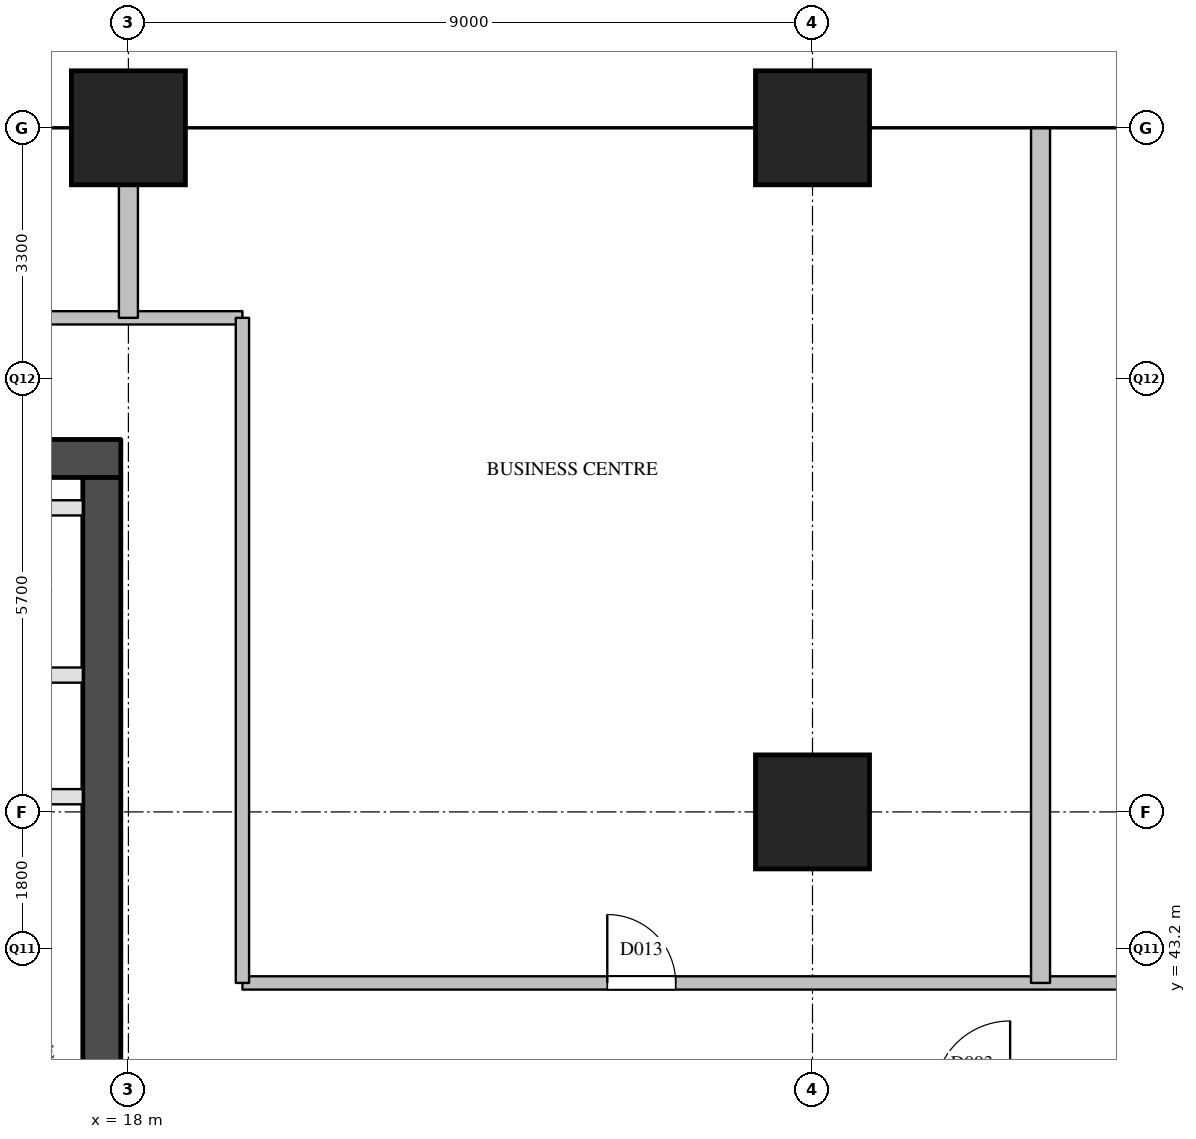
"""IFC4 building model, lengths in metres.
Left out: names, types, materials, properties, quantities, classifications, styles, units other than length and angle.
Written with IfcOpenShell. Run it as: python <this file> out.ifc"""

import sys

from ifc_helpers import new_model, si_unit, direction, frame, frame_2d, origin, origin_2d, place, context, subcontext, project, spatial, rectangle, extrude, element, fill, save


model = new_model("IFC4")
c1 = context("Model", 3, precision=1e-05, world=origin(), true_north=direction((0.0, 1.0)))
c2 = subcontext(c1, "Body", "Model", "MODEL_VIEW")
j1 = project(units=[si_unit("LENGTHUNIT", "METRE"), si_unit("PLANEANGLEUNIT", "RADIAN")], contexts=[c1])
p1 = place(None, origin())
s1 = spatial("IfcSite", under=j1, at=p1, CompositionType="ELEMENT")
p2 = place(p1, origin())
s2 = spatial("IfcBuilding", under=s1, at=p2, CompositionType="ELEMENT")
p3 = place(p2, frame((0.0, 0.0, 150.5)))
s3 = spatial("IfcBuildingStorey", under=s2, at=p3, CompositionType="ELEMENT", Elevation=150.5)
for number, where, z_axis, x_axis in (
    (1, (18.0, 54.0, 0.0), (0.0, 0.0, 1.0), (1.0, 0.0, 0.0)),
    (2, (27.0, 45.0, 0.0), (0.0, 0.0, 1.0), (1.0, 0.0, 0.0)),
    (3, (27.0, 54.0, 0.0), (0.0, 0.0, 1.0), (1.0, 0.0, 0.0)),
):
    element("IfcColumn", number, at=place(p3, frame(where, z_axis=z_axis, x_axis=x_axis)), inside=s3, PredefinedType="COLUMN", context=c2, shape_type="SweptSolid", body=[
        extrude(rectangle(XDim=1.5, YDim=1.5, at=origin_2d()), origin(), (0.0, 0.0, 1.0), 3.9),
    ])
p4 = place(p3, frame((5.7, 49.65, 0.0), z_axis=(0.0, 0.0, 1.0), x_axis=(1.0, 0.0, 0.0)))
e4 = element("IfcWall", 4, at=p4, inside=s3, PredefinedType="SHEAR", context=c2, shape_type="SweptSolid", body=[
    extrude(rectangle(XDim=12.2, YDim=0.5, at=frame_2d((6.1, 0.0))), origin(), (0.0, 0.0, 1.0), 3.6),
])
p5 = place(p3, frame((17.65, 29.1, 0.0), z_axis=(0.0, 0.0, 1.0), x_axis=(0.0, 1.0, 0.0)))
e5 = element("IfcWall", 5, at=p5, inside=s3, PredefinedType="SHEAR", context=c2, shape_type="SweptSolid", body=[
    extrude(rectangle(XDim=20.3, YDim=0.5, at=frame_2d((10.15, 0.0))), origin(), (0.0, 0.0, 1.0), 3.6),
])
p6 = place(p5, frame((1.25, 0.0, 0.0)))
e6 = element("IfcOpeningElement", 6, at=p6, cuts=e5, PredefinedType="OPENING", context=c2, shape_type="SweptSolid", body=[
    extrude(rectangle(XDim=0.7, YDim=2.1, at=frame_2d((0.35, 1.05))), frame((0.0, 0.26, 0.0), z_axis=(0.0, -1.0, 0.0), x_axis=(1.0, 0.0, 0.0)), (0.0, 0.0, 1.0), 0.52),
])
p7 = place(p5, frame((7.05, 0.0, 0.0)))
e7 = element("IfcOpeningElement", 7, at=p7, cuts=e5, PredefinedType="OPENING", context=c2, shape_type="SweptSolid", body=[
    extrude(rectangle(XDim=0.7, YDim=2.1, at=frame_2d((0.35, 1.05))), frame((0.0, 0.26, 0.0), z_axis=(0.0, -1.0, 0.0), x_axis=(1.0, 0.0, 0.0)), (0.0, 0.0, 1.0), 0.52),
])
p8 = place(p5, frame((3.6, 0.0, 0.0)))
e8 = element("IfcOpeningElement", 8, at=p8, cuts=e5, PredefinedType="OPENING", context=c2, shape_type="SweptSolid", body=[
    extrude(rectangle(XDim=1.8, YDim=2.1, at=frame_2d((0.9, 1.05))), frame((0.0, 0.26, 0.0), z_axis=(0.0, -1.0, 0.0), x_axis=(1.0, 0.0, 0.0)), (0.0, 0.0, 1.0), 0.52),
])
p9 = place(p3, frame((12.5, 45.2, 0.0), z_axis=(0.0, 0.0, 1.0), x_axis=(1.0, 0.0, 0.0)))
e9 = element("IfcWall", 9, at=p9, inside=s3, PredefinedType="PARTITIONING", context=c2, shape_type="SweptSolid", body=[
    extrude(rectangle(XDim=4.9, YDim=0.2, at=frame_2d((2.45, 0.0))), origin(), (0.0, 0.0, 1.0), 3.6),
])
p10 = place(p9, frame((0.53, 0.0, 0.0)))
e10 = element("IfcOpeningElement", 10, at=p10, cuts=e9, PredefinedType="OPENING", context=c2, shape_type="SweptSolid", body=[
    extrude(rectangle(XDim=0.9, YDim=2.1, at=frame_2d((0.45, 1.05))), frame((0.0, 0.11, 0.0), z_axis=(0.0, -1.0, 0.0), x_axis=(1.0, 0.0, 0.0)), (0.0, 0.0, 1.0), 0.22),
])
p11 = place(p9, frame((2.98, 0.0, 0.0)))
e11 = element("IfcOpeningElement", 11, at=p11, cuts=e9, PredefinedType="OPENING", context=c2, shape_type="SweptSolid", body=[
    extrude(rectangle(XDim=0.9, YDim=2.1, at=frame_2d((0.45, 1.05))), frame((0.0, 0.11, 0.0), z_axis=(0.0, -1.0, 0.0), x_axis=(1.0, 0.0, 0.0)), (0.0, 0.0, 1.0), 0.22),
])
p12 = place(p3, frame((6.2, 46.8, 0.0), z_axis=(0.0, 0.0, 1.0), x_axis=(1.0, 0.0, 0.0)))
e12 = element("IfcWall", 12, at=p12, inside=s3, PredefinedType="PARTITIONING", context=c2, shape_type="SweptSolid", body=[
    extrude(rectangle(XDim=11.2, YDim=0.2, at=frame_2d((5.6, 0.0))), origin(), (0.0, 0.0, 1.0), 3.6),
])
p13 = place(p12, frame((1.23, 0.0, 0.0)))
e13 = element("IfcOpeningElement", 13, at=p13, cuts=e12, PredefinedType="OPENING", context=c2, shape_type="SweptSolid", body=[
    extrude(rectangle(XDim=0.9, YDim=2.1, at=frame_2d((0.45, 1.05))), frame((0.0, 0.11, 0.0), z_axis=(0.0, -1.0, 0.0), x_axis=(1.0, 0.0, 0.0)), (0.0, 0.0, 1.0), 0.22),
])
p14 = place(p12, frame((6.83, 0.0, 0.0)))
e14 = element("IfcOpeningElement", 14, at=p14, cuts=e12, PredefinedType="OPENING", context=c2, shape_type="SweptSolid", body=[
    extrude(rectangle(XDim=0.9, YDim=2.1, at=frame_2d((0.45, 1.05))), frame((0.0, 0.11, 0.0), z_axis=(0.0, -1.0, 0.0), x_axis=(1.0, 0.0, 0.0)), (0.0, 0.0, 1.0), 0.22),
])
p15 = place(p3, frame((6.2, 49.0, 0.0), z_axis=(0.0, 0.0, 1.0), x_axis=(1.0, 0.0, 0.0)))
e15 = element("IfcWall", 15, at=p15, inside=s3, PredefinedType="PARTITIONING", context=c2, shape_type="SweptSolid", body=[
    extrude(rectangle(XDim=11.2, YDim=0.2, at=frame_2d((5.6, 0.0))), origin(), (0.0, 0.0, 1.0), 3.6),
])
p16 = place(p3, frame((19.5, 42.75, 0.0), z_axis=(0.0, 0.0, 1.0), x_axis=(1.0, 0.0, 0.0)))
e16 = element("IfcWall", 16, at=p16, inside=s3, PredefinedType="PARTITIONING", context=c2, shape_type="SweptSolid", body=[
    extrude(rectangle(XDim=15.0, YDim=0.175, at=frame_2d((7.5, 0.0))), origin(), (0.0, 0.0, 1.0), 2.6),
])
p17 = place(p16, frame((4.8, 0.0, 0.0)))
e17 = element("IfcOpeningElement", 17, at=p17, cuts=e16, PredefinedType="OPENING", context=c2, shape_type="SweptSolid", body=[
    extrude(rectangle(XDim=0.9, YDim=2.1, at=frame_2d((0.45, 1.05))), frame((0.0, 0.097, 0.0), z_axis=(0.0, -1.0, 0.0), x_axis=(1.0, 0.0, 0.0)), (0.0, 0.0, 1.0), 0.195),
])
p18 = place(p3, frame((4.1, 51.5, 0.0), z_axis=(0.0, 0.0, 1.0), x_axis=(1.0, 0.0, 0.0)))
e18 = element("IfcWall", 18, at=p18, inside=s3, PredefinedType="PARTITIONING", context=c2, shape_type="SweptSolid", body=[
    extrude(rectangle(XDim=15.4, YDim=0.175, at=frame_2d((7.7, 0.0))), origin(), (0.0, 0.0, 1.0), 3.6),
])
p19 = place(p3, frame((19.5, 42.75, 0.0), z_axis=(0.0, 0.0, 1.0), x_axis=(0.0, 1.0, 0.0)))
e19 = element("IfcWall", 19, at=p19, inside=s3, PredefinedType="PARTITIONING", context=c2, shape_type="SweptSolid", body=[
    extrude(rectangle(XDim=8.75, YDim=0.175, at=frame_2d((4.375, 0.0))), origin(), (0.0, 0.0, 1.0), 3.6),
])
p20 = place(p3, frame((18.0, 51.5, 0.0), z_axis=(0.0, 0.0, 1.0), x_axis=(0.0, 1.0, 0.0)))
e20 = element("IfcWall", 20, at=p20, inside=s3, PredefinedType="PARTITIONING", context=c2, shape_type="SweptSolid", body=[
    extrude(rectangle(XDim=2.5, YDim=0.25, at=frame_2d((1.25, 0.0))), origin(), (0.0, 0.0, 1.0), 3.6),
])
p21 = place(p3, frame((30.0, 42.75, 0.0), z_axis=(0.0, 0.0, 1.0), x_axis=(0.0, 1.0, 0.0)))
e21 = element("IfcWall", 21, at=p21, inside=s3, PredefinedType="PARTITIONING", context=c2, shape_type="SweptSolid", body=[
    extrude(rectangle(XDim=11.25, YDim=0.25, at=frame_2d((5.625, 0.0))), origin(), (0.0, 0.0, 1.0), 2.6),
])
p22 = place(p17, origin())
e22 = element("IfcDoor", 22, at=p22, inside=s3, OperationType="SINGLE_SWING_LEFT", PredefinedType="DOOR", context=c2, shape_type="SweptSolid", body=[
    extrude(rectangle(XDim=0.9, YDim=2.1, at=frame_2d((0.45, 1.05))), frame((0.0, 0.025, 0.0), z_axis=(0.0, -1.0, 0.0), x_axis=(1.0, 0.0, 0.0)), (0.0, 0.0, 1.0), 0.05),
])
fill(e17, e22)
save(model, sys.argv[1])
